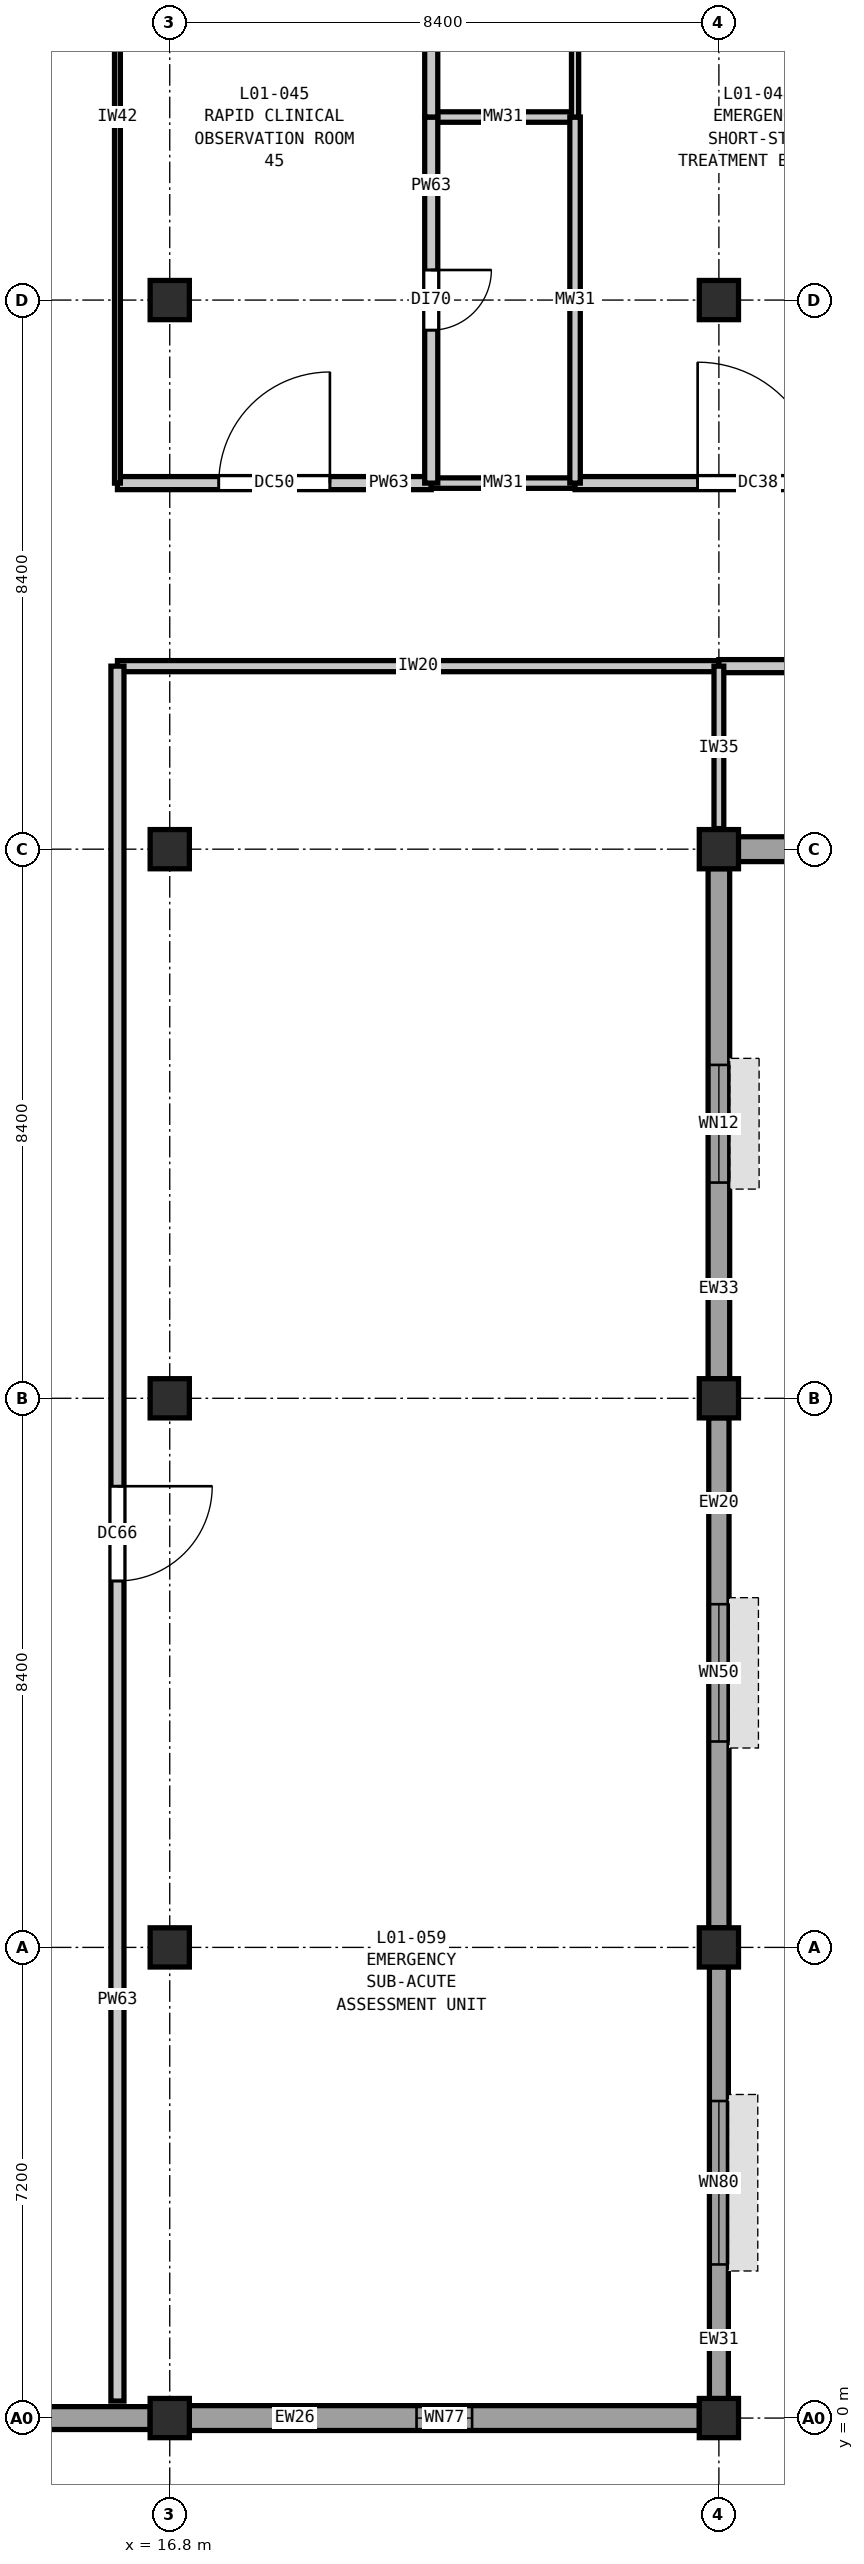
"""IFC4 building model, lengths in metres.
Left out: names, types, materials, properties, quantities, classifications, styles, units other than length and angle.
Written with IfcOpenShell. Run it as: python <this file> out.ifc"""

import sys

from ifc_helpers import new_model, si_unit, direction, frame, frame_2d, origin, origin_2d, place, context, subcontext, project, spatial, rectangle, extrude, element, fill, save


model = new_model("IFC4")
c1 = context("Model", 3, precision=1e-05, world=origin(), true_north=direction((0.0, 1.0)))
c2 = subcontext(c1, "Body", "Model", "MODEL_VIEW")
j1 = project(units=[si_unit("LENGTHUNIT", "METRE"), si_unit("PLANEANGLEUNIT", "RADIAN")], contexts=[c1])
p1 = place(None, origin())
s1 = spatial("IfcSite", under=j1, at=p1, CompositionType="ELEMENT")
p2 = place(p1, origin())
s2 = spatial("IfcBuilding", under=s1, at=p2, CompositionType="ELEMENT")
p3 = place(p2, frame((0.0, 0.0, 5.4)))
s3 = spatial("IfcBuildingStorey", under=s2, at=p3, CompositionType="ELEMENT", Elevation=5.4)
for number, where, z_axis, x_axis in (
    (1, (16.8, 0.0, 0.0), (0.0, 0.0, 1.0), (1.0, 0.0, 0.0)),
    (2, (16.8, 7.2, 0.0), (0.0, 0.0, 1.0), (1.0, 0.0, 0.0)),
    (3, (16.8, 15.6, 0.0), (0.0, 0.0, 1.0), (1.0, 0.0, 0.0)),
    (4, (16.8, 24.0, 0.0), (0.0, 0.0, 1.0), (1.0, 0.0, 0.0)),
    (5, (16.8, 32.4, 0.0), (0.0, 0.0, 1.0), (1.0, 0.0, 0.0)),
    (6, (25.2, 0.0, 0.0), (0.0, 0.0, 1.0), (1.0, 0.0, 0.0)),
    (7, (25.2, 7.2, 0.0), (0.0, 0.0, 1.0), (1.0, 0.0, 0.0)),
    (8, (25.2, 15.6, 0.0), (0.0, 0.0, 1.0), (1.0, 0.0, 0.0)),
    (9, (25.2, 24.0, 0.0), (0.0, 0.0, 1.0), (1.0, 0.0, 0.0)),
    (10, (25.2, 32.4, 0.0), (0.0, 0.0, 1.0), (1.0, 0.0, 0.0)),
):
    element("IfcColumn", number, at=place(p3, frame(where, z_axis=z_axis, x_axis=x_axis)), inside=s3, PredefinedType="COLUMN", context=c2, shape_type="SweptSolid", body=[
        extrude(rectangle(XDim=0.6, YDim=0.6, at=origin_2d()), origin(), (0.0, 0.0, 1.0), 5.4),
    ])
p4 = place(p3, frame((25.2, 23.702, 0.0), z_axis=(0.0, 0.0, 1.0), x_axis=(0.0, -1.0, 0.0)))
e11 = element("IfcWall", 11, at=p4, inside=s3, PredefinedType="SOLIDWALL", context=c2, shape_type="SweptSolid", body=[
    extrude(rectangle(XDim=7.804, YDim=0.33, at=frame_2d((3.902, 0.0))), origin(), (0.0, 0.0, 1.0), 4.68),
])
p5 = place(p4, frame((3.002, 0.0, 0.9)))
e12 = element("IfcOpeningElement", 12, at=p5, cuts=e11, PredefinedType="OPENING", context=c2, shape_type="SweptSolid", body=[
    extrude(rectangle(XDim=1.8, YDim=2.35, at=frame_2d((0.9, 1.175))), frame((0.0, 0.175, 0.0), z_axis=(0.0, -1.0, 0.0), x_axis=(1.0, 0.0, 0.0)), (0.0, 0.0, 1.0), 0.35),
])
p6 = place(p3, frame((25.2, 15.302, 0.0), z_axis=(0.0, 0.0, 1.0), x_axis=(0.0, -1.0, 0.0)))
e13 = element("IfcWall", 13, at=p6, inside=s3, PredefinedType="SOLIDWALL", context=c2, shape_type="SweptSolid", body=[
    extrude(rectangle(XDim=7.804, YDim=0.31, at=frame_2d((3.902, 0.0))), origin(), (0.0, 0.0, 1.0), 4.68),
])
p7 = place(p6, frame((2.852, 0.0, 0.9)))
e14 = element("IfcOpeningElement", 14, at=p7, cuts=e13, PredefinedType="OPENING", context=c2, shape_type="SweptSolid", body=[
    extrude(rectangle(XDim=2.1, YDim=2.35, at=frame_2d((1.05, 1.175))), frame((0.0, 0.165, 0.0), z_axis=(0.0, -1.0, 0.0), x_axis=(1.0, 0.0, 0.0)), (0.0, 0.0, 1.0), 0.33),
])
p8 = place(p3, frame((25.2, 6.902, 0.0), z_axis=(0.0, 0.0, 1.0), x_axis=(0.0, -1.0, 0.0)))
e15 = element("IfcWall", 15, at=p8, inside=s3, PredefinedType="SOLIDWALL", context=c2, shape_type="SweptSolid", body=[
    extrude(rectangle(XDim=6.604, YDim=0.29, at=frame_2d((3.302, 0.0))), origin(), (0.0, 0.0, 1.0), 4.68),
])
p9 = place(p8, frame((2.052, 0.0, 0.9)))
e16 = element("IfcOpeningElement", 16, at=p9, cuts=e15, PredefinedType="OPENING", context=c2, shape_type="SweptSolid", body=[
    extrude(rectangle(XDim=2.5, YDim=2.35, at=frame_2d((1.25, 1.175))), frame((0.0, 0.155, 0.0), z_axis=(0.0, -1.0, 0.0), x_axis=(1.0, 0.0, 0.0)), (0.0, 0.0, 1.0), 0.31),
])
p10 = place(p3, frame((24.902, 0.0, 0.0), z_axis=(0.0, 0.0, 1.0), x_axis=(-1.0, 0.0, 0.0)))
e17 = element("IfcWall", 17, at=p10, inside=s3, PredefinedType="SOLIDWALL", context=c2, shape_type="SweptSolid", body=[
    extrude(rectangle(XDim=7.804, YDim=0.38, at=frame_2d((3.902, 0.0))), origin(), (0.0, 0.0, 1.0), 4.68),
])
p11 = place(p10, frame((3.477, 0.0, 0.9)))
e18 = element("IfcOpeningElement", 18, at=p11, cuts=e17, PredefinedType="OPENING", context=c2, shape_type="SweptSolid", body=[
    extrude(rectangle(XDim=0.85, YDim=1.4, at=frame_2d((0.425, 0.7))), frame((0.0, 0.2, 0.0), z_axis=(0.0, -1.0, 0.0), x_axis=(1.0, 0.0, 0.0)), (0.0, 0.0, 1.0), 0.4),
])
p12 = place(p3, frame((16.502, 0.0, 0.0), z_axis=(0.0, 0.0, 1.0), x_axis=(-1.0, 0.0, 0.0)))
e19 = element("IfcWall", 19, at=p12, inside=s3, PredefinedType="SOLIDWALL", context=c2, shape_type="SweptSolid", body=[
    extrude(rectangle(XDim=7.804, YDim=0.35, at=frame_2d((3.902, 0.0))), origin(), (0.0, 0.0, 1.0), 4.68),
])
p13 = place(p12, frame((4.737, 0.0, 0.9)))
e20 = element("IfcOpeningElement", 20, at=p13, cuts=e19, PredefinedType="OPENING", context=c2, shape_type="SweptSolid", body=[
    extrude(rectangle(XDim=0.95, YDim=1.4, at=frame_2d((0.475, 0.7))), frame((0.0, 0.185, 0.0), z_axis=(0.0, -1.0, 0.0), x_axis=(1.0, 0.0, 0.0)), (0.0, 0.0, 1.0), 0.37),
])
p14 = place(p3, frame((33.302, 24.0, 0.0), z_axis=(0.0, 0.0, 1.0), x_axis=(-1.0, 0.0, 0.0)))
e21 = element("IfcWall", 21, at=p14, inside=s3, PredefinedType="SOLIDWALL", context=c2, shape_type="SweptSolid", body=[
    extrude(rectangle(XDim=7.804, YDim=0.38, at=frame_2d((3.902, 0.0))), origin(), (0.0, 0.0, 1.0), 4.68),
])
p15 = place(p14, frame((3.252, 0.0, 0.9)))
e22 = element("IfcOpeningElement", 22, at=p15, cuts=e21, PredefinedType="OPENING", context=c2, shape_type="SweptSolid", body=[
    extrude(rectangle(XDim=1.3, YDim=1.75, at=frame_2d((0.65, 0.875))), frame((0.0, 0.2, 0.0), z_axis=(0.0, -1.0, 0.0), x_axis=(1.0, 0.0, 0.0)), (0.0, 0.0, 1.0), 0.4),
])
p16 = place(p3, frame((16.0, 26.8, 0.0), z_axis=(0.0, 0.0, 1.0), x_axis=(1.0, 0.0, 0.0)))
e23 = element("IfcWall", 23, at=p16, inside=s3, PredefinedType="PARTITIONING", context=c2, shape_type="SweptSolid", body=[
    extrude(rectangle(XDim=9.2, YDim=0.17, at=frame_2d((4.6, 0.0))), origin(), (0.0, 0.0, 1.0), 5.05),
])
p17 = place(p3, frame((25.2, 26.8, 0.0), z_axis=(0.0, 0.0, 1.0), x_axis=(1.0, 0.0, 0.0)))
e24 = element("IfcWall", 24, at=p17, inside=s3, PredefinedType="PARTITIONING", context=c2, shape_type="SweptSolid", body=[
    extrude(rectangle(XDim=33.6, YDim=0.2, at=frame_2d((16.8, 0.0))), origin(), (0.0, 0.0, 1.0), 5.05),
])
p18 = place(p17, frame((15.875, 0.0, 0.0)))
e25 = element("IfcOpeningElement", 25, at=p18, cuts=e24, PredefinedType="OPENING", context=c2, shape_type="SweptSolid", body=[
    extrude(rectangle(XDim=1.85, YDim=2.3, at=frame_2d((0.925, 1.15))), frame((0.0, 0.11, 0.0), z_axis=(0.0, -1.0, 0.0), x_axis=(1.0, 0.0, 0.0)), (0.0, 0.0, 1.0), 0.22),
])
p19 = place(p3, frame((16.0, 29.6, 0.0), z_axis=(0.0, 0.0, 1.0), x_axis=(1.0, 0.0, 0.0)))
e26 = element("IfcWall", 26, at=p19, inside=s3, PredefinedType="PARTITIONING", context=c2, shape_type="SweptSolid", body=[
    extrude(rectangle(XDim=4.8, YDim=0.2, at=frame_2d((2.4, 0.0))), origin(), (0.0, 0.0, 1.0), 5.05),
])
p20 = place(p19, frame((1.55, 0.0, 0.0)))
e27 = element("IfcOpeningElement", 27, at=p20, cuts=e26, PredefinedType="OPENING", context=c2, shape_type="SweptSolid", body=[
    extrude(rectangle(XDim=1.7, YDim=2.3, at=frame_2d((0.85, 1.15))), frame((0.0, 0.11, 0.0), z_axis=(0.0, -1.0, 0.0), x_axis=(1.0, 0.0, 0.0)), (0.0, 0.0, 1.0), 0.22),
])
p21 = place(p3, frame((20.8, 29.6, 0.0), z_axis=(0.0, 0.0, 1.0), x_axis=(1.0, 0.0, 0.0)))
e28 = element("IfcWall", 28, at=p21, inside=s3, PredefinedType="PLUMBINGWALL", context=c2, shape_type="SweptSolid", body=[
    extrude(rectangle(XDim=2.2, YDim=0.16, at=frame_2d((1.1, 0.0))), origin(), (0.0, 0.0, 1.0), 5.05),
])
p22 = place(p3, frame((23.0, 29.6, 0.0), z_axis=(0.0, 0.0, 1.0), x_axis=(1.0, 0.0, 0.0)))
e29 = element("IfcWall", 29, at=p22, inside=s3, PredefinedType="PARTITIONING", context=c2, shape_type="SweptSolid", body=[
    extrude(rectangle(XDim=5.6, YDim=0.2, at=frame_2d((2.8, 0.0))), origin(), (0.0, 0.0, 1.0), 5.05),
])
p23 = place(p22, frame((1.875, 0.0, 0.0)))
e30 = element("IfcOpeningElement", 30, at=p23, cuts=e29, PredefinedType="OPENING", context=c2, shape_type="SweptSolid", body=[
    extrude(rectangle(XDim=1.85, YDim=2.3, at=frame_2d((0.925, 1.15))), frame((0.0, 0.11, 0.0), z_axis=(0.0, -1.0, 0.0), x_axis=(1.0, 0.0, 0.0)), (0.0, 0.0, 1.0), 0.22),
])
p24 = place(p3, frame((20.8, 35.2, 0.0), z_axis=(0.0, 0.0, 1.0), x_axis=(1.0, 0.0, 0.0)))
e31 = element("IfcWall", 31, at=p24, inside=s3, PredefinedType="PLUMBINGWALL", context=c2, shape_type="SweptSolid", body=[
    extrude(rectangle(XDim=2.2, YDim=0.16, at=frame_2d((1.1, 0.0))), origin(), (0.0, 0.0, 1.0), 5.05),
])
p25 = place(p3, frame((16.0, 0.26, 0.0), z_axis=(0.0, 0.0, 1.0), x_axis=(0.0, 1.0, 0.0)))
e32 = element("IfcWall", 32, at=p25, inside=s3, PredefinedType="PARTITIONING", context=c2, shape_type="SweptSolid", body=[
    extrude(rectangle(XDim=26.54, YDim=0.2, at=frame_2d((13.27, 0.0))), origin(), (0.0, 0.0, 1.0), 5.05),
])
p26 = place(p25, frame((12.545, 0.0, 0.0)))
e33 = element("IfcOpeningElement", 33, at=p26, cuts=e32, PredefinedType="OPENING", context=c2, shape_type="SweptSolid", body=[
    extrude(rectangle(XDim=1.45, YDim=2.25, at=frame_2d((0.725, 1.125))), frame((0.0, 0.11, 0.0), z_axis=(0.0, -1.0, 0.0), x_axis=(1.0, 0.0, 0.0)), (0.0, 0.0, 1.0), 0.22),
])
p27 = place(p3, frame((16.0, 29.6, 0.0), z_axis=(0.0, 0.0, 1.0), x_axis=(0.0, 1.0, 0.0)))
e34 = element("IfcWall", 34, at=p27, inside=s3, PredefinedType="PARTITIONING", context=c2, shape_type="SweptSolid", body=[
    extrude(rectangle(XDim=11.2, YDim=0.09, at=frame_2d((5.6, 0.0))), origin(), (0.0, 0.0, 1.0), 5.05),
])
p28 = place(p3, frame((20.8, 29.6, 0.0), z_axis=(0.0, 0.0, 1.0), x_axis=(0.0, 1.0, 0.0)))
e35 = element("IfcWall", 35, at=p28, inside=s3, PredefinedType="PARTITIONING", context=c2, shape_type="SweptSolid", body=[
    extrude(rectangle(XDim=5.6, YDim=0.2, at=frame_2d((2.8, 0.0))), origin(), (0.0, 0.0, 1.0), 5.05),
])
p29 = place(p28, frame((2.34, 0.0, 0.0)))
e36 = element("IfcOpeningElement", 36, at=p29, cuts=e35, PredefinedType="OPENING", context=c2, shape_type="SweptSolid", body=[
    extrude(rectangle(XDim=0.92, YDim=2.1, at=frame_2d((0.46, 1.05))), frame((0.0, 0.11, 0.0), z_axis=(0.0, -1.0, 0.0), x_axis=(1.0, 0.0, 0.0)), (0.0, 0.0, 1.0), 0.22),
])
p30 = place(p3, frame((20.8, 35.2, 0.0), z_axis=(0.0, 0.0, 1.0), x_axis=(0.0, 1.0, 0.0)))
e37 = element("IfcWall", 37, at=p30, inside=s3, PredefinedType="PARTITIONING", context=c2, shape_type="SweptSolid", body=[
    extrude(rectangle(XDim=5.6, YDim=0.2, at=frame_2d((2.8, 0.0))), origin(), (0.0, 0.0, 1.0), 5.05),
])
p31 = place(p30, frame((1.95, 0.0, 0.0)))
e38 = element("IfcOpeningElement", 38, at=p31, cuts=e37, PredefinedType="OPENING", context=c2, shape_type="SweptSolid", body=[
    extrude(rectangle(XDim=1.7, YDim=2.3, at=frame_2d((0.85, 1.15))), frame((0.0, 0.11, 0.0), z_axis=(0.0, -1.0, 0.0), x_axis=(1.0, 0.0, 0.0)), (0.0, 0.0, 1.0), 0.22),
])
p32 = place(p3, frame((23.0, 29.6, 0.0), z_axis=(0.0, 0.0, 1.0), x_axis=(0.0, 1.0, 0.0)))
e39 = element("IfcWall", 39, at=p32, inside=s3, PredefinedType="PLUMBINGWALL", context=c2, shape_type="SweptSolid", body=[
    extrude(rectangle(XDim=5.6, YDim=0.16, at=frame_2d((2.8, 0.0))), origin(), (0.0, 0.0, 1.0), 5.05),
])
p33 = place(p3, frame((23.0, 35.2, 0.0), z_axis=(0.0, 0.0, 1.0), x_axis=(0.0, 1.0, 0.0)))
e40 = element("IfcWall", 40, at=p33, inside=s3, PredefinedType="PARTITIONING", context=c2, shape_type="SweptSolid", body=[
    extrude(rectangle(XDim=5.6, YDim=0.11, at=frame_2d((2.8, 0.0))), origin(), (0.0, 0.0, 1.0), 5.05),
])
p34 = place(p3, frame((25.2, 24.315, 0.0), z_axis=(0.0, 0.0, 1.0), x_axis=(0.0, 1.0, 0.0)))
e41 = element("IfcWall", 41, at=p34, inside=s3, PredefinedType="PARTITIONING", context=c2, shape_type="SweptSolid", body=[
    extrude(rectangle(XDim=2.485, YDim=0.15, at=frame_2d((1.243, 0.0))), origin(), (0.0, 0.0, 1.0), 4.735),
])
p35 = place(p5, origin())
e42 = element("IfcWindow", 42, at=p35, inside=s3, PartitioningType="DOUBLE_PANEL_VERTICAL", PredefinedType="WINDOW", context=c2, shape_type="SweptSolid", body=[
    extrude(rectangle(XDim=1.8, YDim=2.35, at=frame_2d((0.9, 1.175))), frame((0.0, 0.03, 0.0), z_axis=(0.0, -1.0, 0.0), x_axis=(1.0, 0.0, 0.0)), (0.0, 0.0, 1.0), 0.06),
])
fill(e12, e42)
p36 = place(p7, origin())
e43 = element("IfcWindow", 43, at=p36, inside=s3, PartitioningType="DOUBLE_PANEL_VERTICAL", PredefinedType="WINDOW", context=c2, shape_type="SweptSolid", body=[
    extrude(rectangle(XDim=2.1, YDim=2.35, at=frame_2d((1.05, 1.175))), frame((0.0, 0.03, 0.0), z_axis=(0.0, -1.0, 0.0), x_axis=(1.0, 0.0, 0.0)), (0.0, 0.0, 1.0), 0.06),
])
fill(e14, e43)
p37 = place(p9, origin())
e44 = element("IfcWindow", 44, at=p37, inside=s3, PartitioningType="DOUBLE_PANEL_VERTICAL", PredefinedType="WINDOW", context=c2, shape_type="SweptSolid", body=[
    extrude(rectangle(XDim=2.5, YDim=2.35, at=frame_2d((1.25, 1.175))), frame((0.0, 0.03, 0.0), z_axis=(0.0, -1.0, 0.0), x_axis=(1.0, 0.0, 0.0)), (0.0, 0.0, 1.0), 0.06),
])
fill(e16, e44)
p38 = place(p11, origin())
e45 = element("IfcWindow", 45, at=p38, inside=s3, PartitioningType="SINGLE_PANEL", PredefinedType="WINDOW", context=c2, shape_type="SweptSolid", body=[
    extrude(rectangle(XDim=0.85, YDim=1.4, at=frame_2d((0.425, 0.7))), frame((0.0, 0.03, 0.0), z_axis=(0.0, -1.0, 0.0), x_axis=(1.0, 0.0, 0.0)), (0.0, 0.0, 1.0), 0.06),
])
fill(e18, e45)
p39 = place(p20, origin())
e46 = element("IfcDoor", 46, at=p39, inside=s3, OperationType="SINGLE_SWING_RIGHT", PredefinedType="DOOR", context=c2, shape_type="SweptSolid", body=[
    extrude(rectangle(XDim=1.7, YDim=2.3, at=frame_2d((0.85, 1.15))), frame((0.0, 0.025, 0.0), z_axis=(0.0, -1.0, 0.0), x_axis=(1.0, 0.0, 0.0)), (0.0, 0.0, 1.0), 0.05),
])
fill(e27, e46)
p40 = place(p23, origin())
e47 = element("IfcDoor", 47, at=p40, inside=s3, OperationType="SINGLE_SWING_LEFT", PredefinedType="DOOR", context=c2, shape_type="SweptSolid", body=[
    extrude(rectangle(XDim=1.85, YDim=2.3, at=frame_2d((0.925, 1.15))), frame((0.0, 0.025, 0.0), z_axis=(0.0, -1.0, 0.0), x_axis=(1.0, 0.0, 0.0)), (0.0, 0.0, 1.0), 0.05),
])
fill(e30, e47)
p41 = place(p26, frame((1.45, 0.0, 0.0), z_axis=(0.0, 0.0, 1.0), x_axis=(-1.0, 0.0, 0.0)))
e48 = element("IfcDoor", 48, at=p41, inside=s3, OperationType="SINGLE_SWING_LEFT", PredefinedType="DOOR", context=c2, shape_type="SweptSolid", body=[
    extrude(rectangle(XDim=1.45, YDim=2.25, at=frame_2d((0.725, 1.125))), frame((0.0, 0.025, 0.0), z_axis=(0.0, -1.0, 0.0), x_axis=(1.0, 0.0, 0.0)), (0.0, 0.0, 1.0), 0.05),
])
fill(e33, e48)
p42 = place(p29, frame((0.92, 0.0, 0.0), z_axis=(0.0, 0.0, 1.0), x_axis=(-1.0, 0.0, 0.0)))
e49 = element("IfcDoor", 49, at=p42, inside=s3, OperationType="SINGLE_SWING_LEFT", PredefinedType="DOOR", context=c2, shape_type="SweptSolid", body=[
    extrude(rectangle(XDim=0.92, YDim=2.1, at=frame_2d((0.46, 1.05))), frame((0.0, 0.025, 0.0), z_axis=(0.0, -1.0, 0.0), x_axis=(1.0, 0.0, 0.0)), (0.0, 0.0, 1.0), 0.05),
])
fill(e36, e49)
save(model, sys.argv[1])
